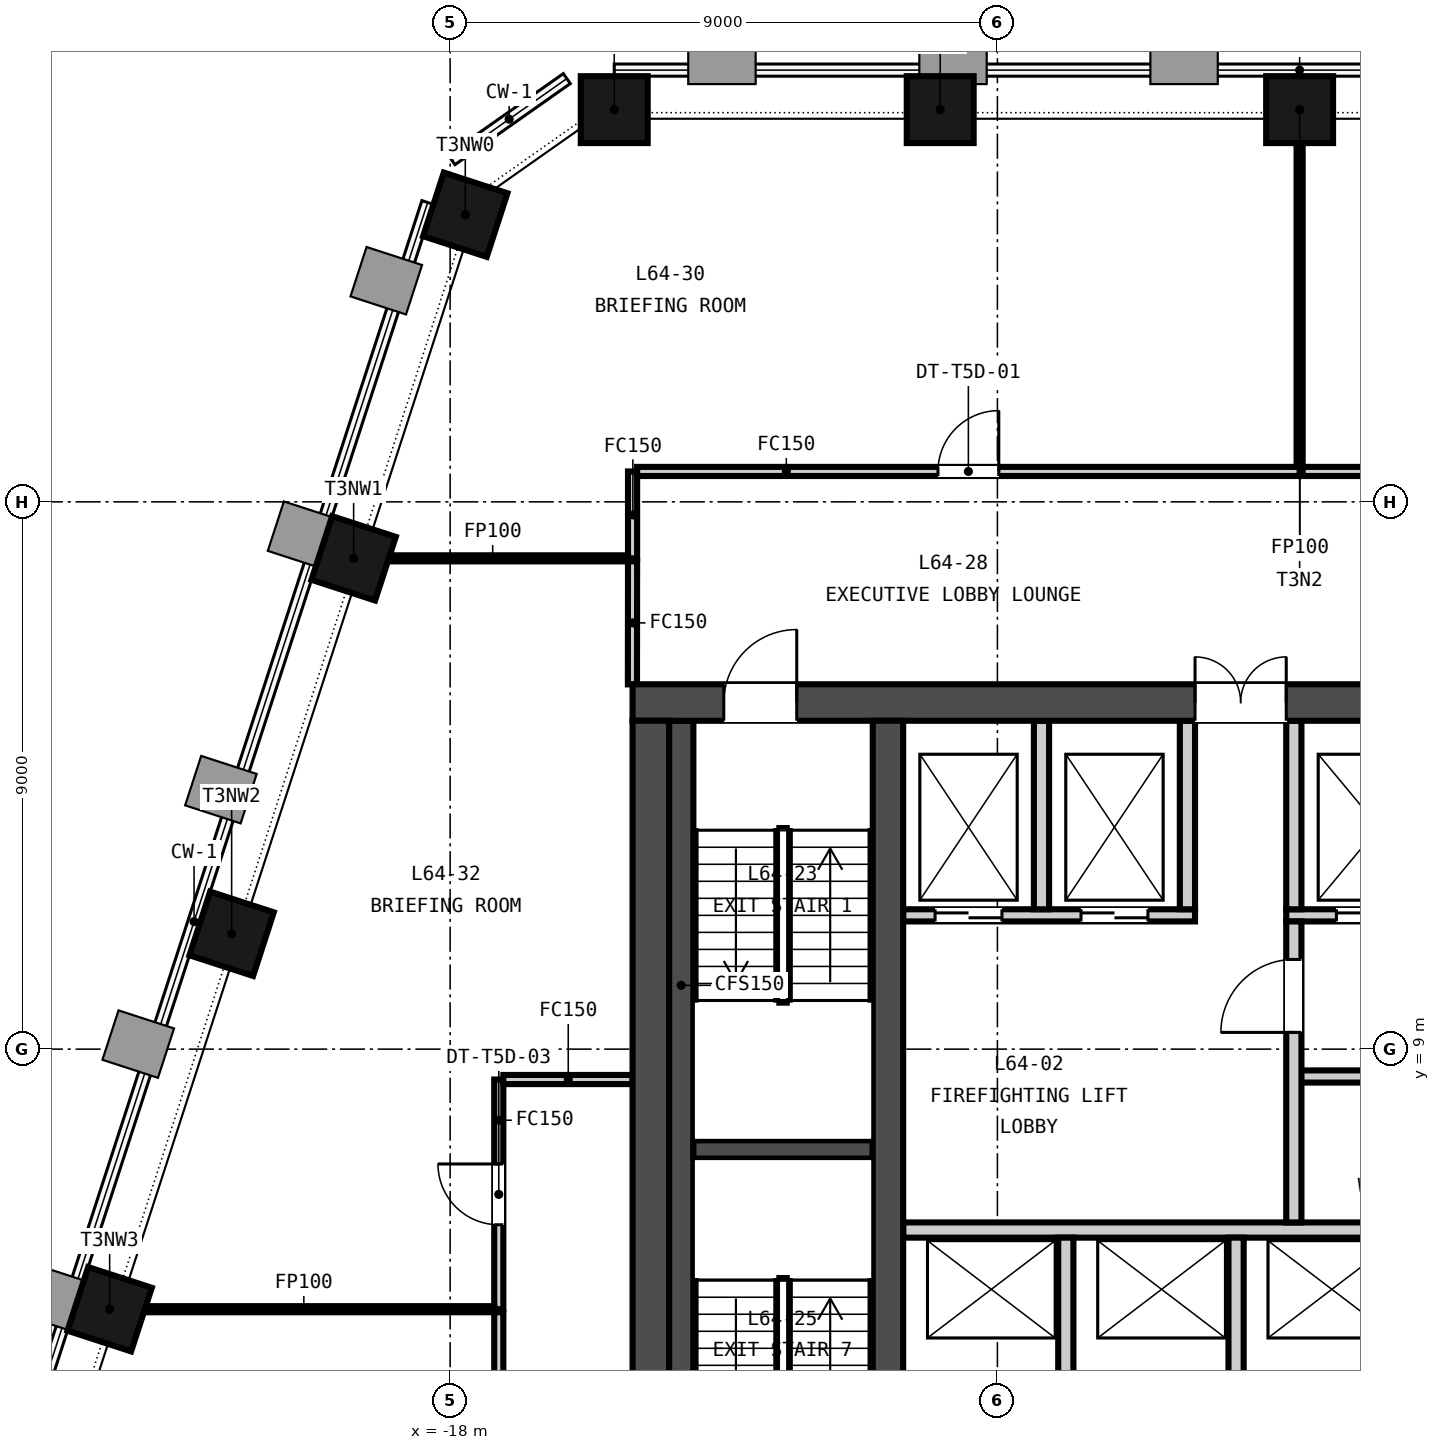
"""IFC4 building model, lengths in metres.
Left out: names, types, materials, properties, quantities, classifications, styles, units other than length and angle.
Written with IfcOpenShell. Run it as: python <this file> out.ifc"""

import sys

from ifc_helpers import new_model, si_unit, direction, frame, frame_2d, origin, origin_2d, place, context, subcontext, project, spatial, rectangle, extrude, element, fill, save


model = new_model("IFC4")
c1 = context("Model", 3, precision=1e-05, world=origin(), true_north=direction((0.0, 1.0)))
c2 = subcontext(c1, "Body", "Model", "MODEL_VIEW")
j1 = project(units=[si_unit("LENGTHUNIT", "METRE"), si_unit("PLANEANGLEUNIT", "RADIAN")], contexts=[c1])
p1 = place(None, origin())
s1 = spatial("IfcSite", under=j1, at=p1, CompositionType="ELEMENT")
p2 = place(p1, origin())
s2 = spatial("IfcBuilding", under=s1, at=p2, CompositionType="ELEMENT")
p3 = place(p2, frame((0.0, 0.0, 252.8)))
s3 = spatial("IfcBuildingStorey", under=s2, at=p3, CompositionType="ELEMENT", Elevation=252.8)
p4 = place(p3, frame((-15.0, 14.7, -0.15), z_axis=(0.0, 0.0, 1.0), x_axis=(1.0, 0.0, 0.0)))
e1 = element("IfcWall", 1, at=p4, inside=s3, PredefinedType="SOLIDWALL", context=c2, shape_type="SweptSolid", body=[
    extrude(rectangle(XDim=30.0, YDim=0.6, at=frame_2d((15.0, 0.0))), origin(), (0.0, 0.0, 1.0), 3.5),
])
p5 = place(p4, frame((9.25, 0.0, 0.15)))
e2 = element("IfcOpeningElement", 2, at=p5, cuts=e1, PredefinedType="OPENING", context=c2, shape_type="SweptSolid", body=[
    extrude(rectangle(XDim=1.5, YDim=2.1, at=frame_2d((0.75, 1.05))), frame((0.0, 0.31, 0.0), z_axis=(0.0, -1.0, 0.0), x_axis=(1.0, 0.0, 0.0)), (0.0, 0.0, 1.0), 0.62),
])
p6 = place(p4, frame((19.4, 0.0, 0.15)))
e3 = element("IfcOpeningElement", 3, at=p6, cuts=e1, PredefinedType="OPENING", context=c2, shape_type="SweptSolid", body=[
    extrude(rectangle(XDim=1.5, YDim=2.1, at=frame_2d((0.75, 1.05))), frame((0.0, 0.31, 0.0), z_axis=(0.0, -1.0, 0.0), x_axis=(1.0, 0.0, 0.0)), (0.0, 0.0, 1.0), 0.62),
])
p7 = place(p4, frame((1.5, 0.0, 0.15)))
e4 = element("IfcOpeningElement", 4, at=p7, cuts=e1, PredefinedType="OPENING", context=c2, shape_type="SweptSolid", body=[
    extrude(rectangle(XDim=1.2, YDim=2.1, at=frame_2d((0.6, 1.05))), frame((0.0, 0.31, 0.0), z_axis=(0.0, -1.0, 0.0), x_axis=(1.0, 0.0, 0.0)), (0.0, 0.0, 1.0), 0.62),
])
p8 = place(p4, frame((27.3, 0.0, 0.15)))
e5 = element("IfcOpeningElement", 5, at=p8, cuts=e1, PredefinedType="OPENING", context=c2, shape_type="SweptSolid", body=[
    extrude(rectangle(XDim=1.2, YDim=2.1, at=frame_2d((0.6, 1.05))), frame((0.0, 0.31, 0.0), z_axis=(0.0, -1.0, 0.0), x_axis=(1.0, 0.0, 0.0)), (0.0, 0.0, 1.0), 0.62),
])
p9 = place(p3, frame((-14.7, 0.6, -0.15), z_axis=(0.0, 0.0, 1.0), x_axis=(0.0, 1.0, 0.0)))
e6 = element("IfcWall", 6, at=p9, inside=s3, PredefinedType="SOLIDWALL", context=c2, shape_type="SweptSolid", body=[
    extrude(rectangle(XDim=13.8, YDim=0.6, at=frame_2d((6.9, 0.0))), origin(), (0.0, 0.0, 1.0), 3.5),
])
p10 = place(p3, frame((-10.8, 0.6, -0.15), z_axis=(0.0, 0.0, 1.0), x_axis=(0.0, 1.0, 0.0)))
e7 = element("IfcWall", 7, at=p10, inside=s3, PredefinedType="SOLIDWALL", context=c2, shape_type="SweptSolid", body=[
    extrude(rectangle(XDim=13.8, YDim=0.5, at=frame_2d((6.9, 0.0))), origin(), (0.0, 0.0, 1.0), 3.5),
])
for number, where, z_axis, x_axis in (
    (8, (-4.03, 24.45, -0.15), (0.0, 0.0, 1.0), (-1.0, 0.0, 0.0)),
    (9, (-9.941, 24.45, -0.15), (0.0, 0.0, 1.0), (-1.0, 0.0, 0.0)),
    (10, (-15.301, 24.45, -0.15), (0.0, 0.0, 1.0), (-1.0, 0.0, 0.0)),
    (11, (-17.751, 22.722, -0.15), (0.0, 0.0, 1.0), (-0.309, -0.951, 0.0)),
    (12, (-19.587, 17.071, -0.15), (0.0, 0.0, 1.0), (-0.309, -0.951, 0.0)),
    (13, (-21.593, 10.897, -0.15), (0.0, 0.0, 1.0), (-0.309, -0.951, 0.0)),
    (14, (-23.599, 4.723, -0.15), (0.0, 0.0, 1.0), (-0.309, -0.951, 0.0)),
):
    element("IfcColumn", number, at=place(p3, frame(where, z_axis=z_axis, x_axis=x_axis)), inside=s3, PredefinedType="COLUMN", context=c2, shape_type="SweptSolid", body=[
        extrude(rectangle(XDim=1.1, YDim=1.1, at=origin_2d()), origin(), (0.0, 0.0, 1.0), 3.5),
    ])
p11 = place(p3, frame((-10.55, 6.025, 0.0), z_axis=(0.0, 0.0, 1.0), x_axis=(1.0, 0.0, 0.0)))
e15 = element("IfcWall", 15, at=p11, inside=s3, PredefinedType="PARTITIONING", context=c2, shape_type="SweptSolid", body=[
    extrude(rectangle(XDim=21.1, YDim=0.25, at=frame_2d((10.55, 0.0))), origin(), (0.0, 0.0, 1.0), 3.35),
])
p12 = place(p3, frame((-4.125, 8.55, 0.0), z_axis=(0.0, 0.0, 1.0), x_axis=(1.0, 0.0, 0.0)))
e16 = element("IfcWall", 16, at=p12, inside=s3, PredefinedType="PARTITIONING", context=c2, shape_type="SweptSolid", body=[
    extrude(rectangle(XDim=14.675, YDim=0.2, at=frame_2d((7.337, 0.0))), origin(), (0.0, 0.0, 1.0), 3.35),
])
p13 = place(p12, frame((1.413, 0.0, 0.0)))
e17 = element("IfcOpeningElement", 17, at=p13, cuts=e16, PredefinedType="OPENING", context=c2, shape_type="SweptSolid", body=[
    extrude(rectangle(XDim=1.0, YDim=2.1, at=frame_2d((0.5, 1.05))), frame((0.0, 0.11, 0.0), z_axis=(0.0, -1.0, 0.0), x_axis=(1.0, 0.0, 0.0)), (0.0, 0.0, 1.0), 0.22),
])
p14 = place(p12, frame((5.0, 0.0, 0.0)))
e18 = element("IfcOpeningElement", 18, at=p14, cuts=e16, PredefinedType="OPENING", context=c2, shape_type="SweptSolid", body=[
    extrude(rectangle(XDim=1.0, YDim=2.1, at=frame_2d((0.5, 1.05))), frame((0.0, 0.11, 0.0), z_axis=(0.0, -1.0, 0.0), x_axis=(1.0, 0.0, 0.0)), (0.0, 0.0, 1.0), 0.22),
])
p15 = place(p12, frame((9.613, 0.0, 0.0)))
e19 = element("IfcOpeningElement", 19, at=p15, cuts=e16, PredefinedType="OPENING", context=c2, shape_type="SweptSolid", body=[
    extrude(rectangle(XDim=1.0, YDim=2.1, at=frame_2d((0.5, 1.05))), frame((0.0, 0.11, 0.0), z_axis=(0.0, -1.0, 0.0), x_axis=(1.0, 0.0, 0.0)), (0.0, 0.0, 1.0), 0.22),
])
p16 = place(p12, frame((13.475, 0.0, 0.0)))
e20 = element("IfcOpeningElement", 20, at=p16, cuts=e16, PredefinedType="OPENING", context=c2, shape_type="SweptSolid", body=[
    extrude(rectangle(XDim=0.9, YDim=2.1, at=frame_2d((0.45, 1.05))), frame((0.0, 0.11, 0.0), z_axis=(0.0, -1.0, 0.0), x_axis=(1.0, 0.0, 0.0)), (0.0, 0.0, 1.0), 0.22),
])
p17 = place(p3, frame((-10.55, 11.2, 0.0), z_axis=(0.0, 0.0, 1.0), x_axis=(1.0, 0.0, 0.0)))
e21 = element("IfcWall", 21, at=p17, inside=s3, PredefinedType="PARTITIONING", context=c2, shape_type="SweptSolid", body=[
    extrude(rectangle(XDim=4.8, YDim=0.2, at=frame_2d((2.4, 0.0))), origin(), (0.0, 0.0, 1.0), 3.35),
])
p18 = place(p17, frame((0.525, 0.0, 0.0)))
e22 = element("IfcOpeningElement", 22, at=p18, cuts=e21, PredefinedType="OPENING", context=c2, shape_type="SweptSolid", body=[
    extrude(rectangle(XDim=1.1, YDim=2.1, at=frame_2d((0.55, 1.05))), frame((0.0, 0.11, 0.0), z_axis=(0.0, -1.0, 0.0), x_axis=(1.0, 0.0, 0.0)), (0.0, 0.0, 1.0), 0.22),
])
p19 = place(p17, frame((2.925, 0.0, 0.0)))
e23 = element("IfcOpeningElement", 23, at=p19, cuts=e21, PredefinedType="OPENING", context=c2, shape_type="SweptSolid", body=[
    extrude(rectangle(XDim=1.1, YDim=2.1, at=frame_2d((0.55, 1.05))), frame((0.0, 0.11, 0.0), z_axis=(0.0, -1.0, 0.0), x_axis=(1.0, 0.0, 0.0)), (0.0, 0.0, 1.0), 0.22),
])
p20 = place(p3, frame((-4.25, 11.2, 0.0), z_axis=(0.0, 0.0, 1.0), x_axis=(1.0, 0.0, 0.0)))
e24 = element("IfcWall", 24, at=p20, inside=s3, PredefinedType="PARTITIONING", context=c2, shape_type="SweptSolid", body=[
    extrude(rectangle(XDim=8.65, YDim=0.2, at=frame_2d((4.325, 0.0))), origin(), (0.0, 0.0, 1.0), 3.35),
])
p21 = place(p20, frame((0.825, 0.0, 0.0)))
e25 = element("IfcOpeningElement", 25, at=p21, cuts=e24, PredefinedType="OPENING", context=c2, shape_type="SweptSolid", body=[
    extrude(rectangle(XDim=1.4, YDim=2.1, at=frame_2d((0.7, 1.05))), frame((0.0, 0.11, 0.0), z_axis=(0.0, -1.0, 0.0), x_axis=(1.0, 0.0, 0.0)), (0.0, 0.0, 1.0), 0.22),
])
p22 = place(p20, frame((3.625, 0.0, 0.0)))
e26 = element("IfcOpeningElement", 26, at=p22, cuts=e24, PredefinedType="OPENING", context=c2, shape_type="SweptSolid", body=[
    extrude(rectangle(XDim=1.4, YDim=2.1, at=frame_2d((0.7, 1.05))), frame((0.0, 0.11, 0.0), z_axis=(0.0, -1.0, 0.0), x_axis=(1.0, 0.0, 0.0)), (0.0, 0.0, 1.0), 0.22),
])
p23 = place(p20, frame((6.675, 0.0, 0.0)))
e27 = element("IfcOpeningElement", 27, at=p23, cuts=e24, PredefinedType="OPENING", context=c2, shape_type="SweptSolid", body=[
    extrude(rectangle(XDim=0.9, YDim=2.1, at=frame_2d((0.45, 1.05))), frame((0.0, 0.11, 0.0), z_axis=(0.0, -1.0, 0.0), x_axis=(1.0, 0.0, 0.0)), (0.0, 0.0, 1.0), 0.22),
])
p24 = place(p3, frame((-4.125, 6.15, 0.0), z_axis=(0.0, 0.0, 1.0), x_axis=(0.0, 1.0, 0.0)))
e28 = element("IfcWall", 28, at=p24, inside=s3, PredefinedType="PARTITIONING", context=c2, shape_type="SweptSolid", body=[
    extrude(rectangle(XDim=4.95, YDim=0.25, at=frame_2d((2.475, 0.0))), origin(), (0.0, 0.0, 1.0), 3.35),
])
p25 = place(p24, frame((3.125, 0.0, 0.0)))
e29 = element("IfcOpeningElement", 29, at=p25, cuts=e28, PredefinedType="OPENING", context=c2, shape_type="SweptSolid", body=[
    extrude(rectangle(XDim=1.2, YDim=2.1, at=frame_2d((0.6, 1.05))), frame((0.0, 0.135, 0.0), z_axis=(0.0, -1.0, 0.0), x_axis=(1.0, 0.0, 0.0)), (0.0, 0.0, 1.0), 0.27),
])
for number, where, z_axis, x_axis in (
    (30, (-7.875, 3.6, 0.0), (0.0, 0.0, 1.0), (0.0, 1.0, 0.0)),
    (31, (-5.075, 3.6, 0.0), (0.0, 0.0, 1.0), (0.0, 1.0, 0.0)),
):
    element("IfcWall", number, at=place(p3, frame(where, z_axis=z_axis, x_axis=x_axis)), inside=s3, PredefinedType="PARTITIONING", context=c2, shape_type="SweptSolid", body=[
        extrude(rectangle(XDim=2.3, YDim=0.25, at=frame_2d((1.15, 0.0))), origin(), (0.0, 0.0, 1.0), 3.35),
    ])
for number, where, z_axis, x_axis in (
    (32, (-8.275, 11.3, 0.0), (0.0, 0.0, 1.0), (0.0, 1.0, 0.0)),
    (33, (-5.875, 11.3, 0.0), (0.0, 0.0, 1.0), (0.0, 1.0, 0.0)),
    (34, (-4.125, 11.3, 0.0), (0.0, 0.0, 1.0), (0.0, 1.0, 0.0)),
):
    element("IfcWall", number, at=place(p3, frame(where, z_axis=z_axis, x_axis=x_axis)), inside=s3, PredefinedType="PARTITIONING", context=c2, shape_type="SweptSolid", body=[
        extrude(rectangle(XDim=3.1, YDim=0.25, at=frame_2d((1.55, 0.0))), origin(), (0.0, 0.0, 1.0), 3.35),
    ])
p26 = place(p3, frame((-14.0, 7.35, 0.0), z_axis=(0.0, 0.0, 1.0), x_axis=(1.0, 0.0, 0.0)))
e35 = element("IfcWall", 35, at=p26, inside=s3, PredefinedType="SOLIDWALL", context=c2, shape_type="SweptSolid", body=[
    extrude(rectangle(XDim=2.95, YDim=0.3, at=frame_2d((1.475, 0.0))), origin(), (0.0, 0.0, 1.0), 3.35),
])
p27 = place(p3, frame((-14.2, 0.6, 0.0), z_axis=(0.0, 0.0, 1.0), x_axis=(0.0, 1.0, 0.0)))
e36 = element("IfcWall", 36, at=p27, inside=s3, PredefinedType="SOLIDWALL", context=c2, shape_type="SweptSolid", body=[
    extrude(rectangle(XDim=13.8, YDim=0.4, at=frame_2d((6.9, 0.0))), origin(), (0.0, 0.0, 1.0), 3.35),
])
p28 = place(p3, frame((-15.0, 17.071, 0.0), z_axis=(0.0, 0.0, 1.0), x_axis=(0.0, 1.0, 0.0)))
e37 = element("IfcWall", 37, at=p28, inside=s3, PredefinedType="PARTITIONING", context=c2, shape_type="SweptSolid", body=[
    extrude(rectangle(XDim=1.429, YDim=0.15, at=frame_2d((0.714, 0.0))), origin(), (0.0, 0.0, 1.0), 2.601),
])
p29 = place(p3, frame((-14.925, 18.5, 0.0), z_axis=(0.0, 0.0, 1.0), x_axis=(1.0, 0.0, 0.0)))
e38 = element("IfcWall", 38, at=p29, inside=s3, PredefinedType="PARTITIONING", context=c2, shape_type="SweptSolid", body=[
    extrude(rectangle(XDim=10.895, YDim=0.15, at=frame_2d((5.448, 0.0))), origin(), (0.0, 0.0, 1.0), 2.601),
])
p30 = place(p29, frame((4.948, 0.0, 0.0)))
e39 = element("IfcOpeningElement", 39, at=p30, cuts=e38, PredefinedType="OPENING", context=c2, shape_type="SweptSolid", body=[
    extrude(rectangle(XDim=1.0, YDim=2.1, at=frame_2d((0.5, 1.05))), frame((0.0, 0.085, 0.0), z_axis=(0.0, -1.0, 0.0), x_axis=(1.0, 0.0, 0.0)), (0.0, 0.0, 1.0), 0.17),
])
p31 = place(p3, frame((-4.03, 18.575, 0.0), z_axis=(0.0, 0.0, 1.0), x_axis=(0.0, 1.0, 0.0)))
e40 = element("IfcWall", 40, at=p31, inside=s3, PredefinedType="PARTITIONING", context=c2, shape_type="SweptSolid", body=[
    extrude(rectangle(XDim=5.825, YDim=0.1, at=frame_2d((2.913, 0.0))), origin(), (0.0, 0.0, 1.0), 2.601),
])
p32 = place(p3, frame((-19.535, 17.071, 0.0), z_axis=(0.0, 0.0, 1.0), x_axis=(1.0, 0.0, 0.0)))
e41 = element("IfcWall", 41, at=p32, inside=s3, PredefinedType="PARTITIONING", context=c2, shape_type="SweptSolid", body=[
    extrude(rectangle(XDim=4.46, YDim=0.1, at=frame_2d((2.23, 0.0))), origin(), (0.0, 0.0, 1.0), 2.601),
])
p33 = place(p3, frame((-3.98, 18.5, 0.0), z_axis=(0.0, 0.0, 1.0), x_axis=(1.0, 0.0, 0.0)))
e42 = element("IfcWall", 42, at=p33, inside=s3, PredefinedType="PARTITIONING", context=c2, shape_type="SweptSolid", body=[
    extrude(rectangle(XDim=16.595, YDim=0.15, at=frame_2d((8.297, 0.0))), origin(), (0.0, 0.0, 1.0), 2.601),
])
p34 = place(p33, frame((7.847, 0.0, 0.0)))
e43 = element("IfcOpeningElement", 43, at=p34, cuts=e42, PredefinedType="OPENING", context=c2, shape_type="SweptSolid", body=[
    extrude(rectangle(XDim=0.9, YDim=2.1, at=frame_2d((0.45, 1.05))), frame((0.0, 0.085, 0.0), z_axis=(0.0, -1.0, 0.0), x_axis=(1.0, 0.0, 0.0)), (0.0, 0.0, 1.0), 0.17),
])
p35 = place(p3, frame((-15.002, 14.998, 0.0), z_axis=(0.0, 0.0, 1.0), x_axis=(0.000965483499, 0.999999533921, 0.0)))
e44 = element("IfcWall", 44, at=p35, inside=s3, PredefinedType="PARTITIONING", context=c2, shape_type="SweptSolid", body=[
    extrude(rectangle(XDim=2.023, YDim=0.15, at=frame_2d((1.011, 0.0))), origin(), (0.0, 0.0, 1.0), 2.601),
])
p36 = place(p3, frame((-17.2, 4.723, 0.0), z_axis=(0.0, 0.0, 1.0), x_axis=(0.0, 1.0, 0.0)))
e45 = element("IfcWall", 45, at=p36, inside=s3, PredefinedType="PARTITIONING", context=c2, shape_type="SweptSolid", body=[
    extrude(rectangle(XDim=3.777, YDim=0.15, at=frame_2d((1.889, 0.0))), origin(), (0.0, 0.0, 1.0), 2.601),
])
p37 = place(p36, frame((1.388, 0.0, 0.0)))
e46 = element("IfcOpeningElement", 46, at=p37, cuts=e45, PredefinedType="OPENING", context=c2, shape_type="SweptSolid", body=[
    extrude(rectangle(XDim=1.0, YDim=2.1, at=frame_2d((0.5, 1.05))), frame((0.0, 0.085, 0.0), z_axis=(0.0, -1.0, 0.0), x_axis=(1.0, 0.0, 0.0)), (0.0, 0.0, 1.0), 0.17),
])
p38 = place(p3, frame((-17.125, 8.5, 0.0), z_axis=(0.0, 0.0, 1.0), x_axis=(1.0, 0.0, 0.0)))
e47 = element("IfcWall", 47, at=p38, inside=s3, PredefinedType="PARTITIONING", context=c2, shape_type="SweptSolid", body=[
    extrude(rectangle(XDim=2.125, YDim=0.15, at=frame_2d((1.062, 0.0))), origin(), (0.0, 0.0, 1.0), 2.601),
])
p39 = place(p3, frame((-23.547, 4.723, 0.0), z_axis=(0.0, 0.0, 1.0), x_axis=(1.0, 0.0, 0.0)))
e48 = element("IfcWall", 48, at=p39, inside=s3, PredefinedType="PARTITIONING", context=c2, shape_type="SweptSolid", body=[
    extrude(rectangle(XDim=6.272, YDim=0.1, at=frame_2d((3.136, 0.0))), origin(), (0.0, 0.0, 1.0), 2.601),
])
p40 = place(p3, frame((-17.2, -4.1, 0.0), z_axis=(0.0, 0.0, 1.0), x_axis=(0.0, 1.0, 0.0)))
e49 = element("IfcWall", 49, at=p40, inside=s3, PredefinedType="PARTITIONING", context=c2, shape_type="SweptSolid", body=[
    extrude(rectangle(XDim=8.773, YDim=0.15, at=frame_2d((4.387, 0.0))), origin(), (0.0, 0.0, 1.0), 2.601),
])
p41 = place(p40, frame((3.886, 0.0, 0.0)))
e50 = element("IfcOpeningElement", 50, at=p41, cuts=e49, PredefinedType="OPENING", context=c2, shape_type="SweptSolid", body=[
    extrude(rectangle(XDim=1.0, YDim=2.1, at=frame_2d((0.5, 1.05))), frame((0.0, 0.085, 0.0), z_axis=(0.0, -1.0, 0.0), x_axis=(1.0, 0.0, 0.0)), (0.0, 0.0, 1.0), 0.17),
])
p42 = place(p25, origin())
e51 = element("IfcDoor", 51, at=p42, inside=s3, OperationType="SINGLE_SWING_LEFT", PredefinedType="DOOR", context=c2, shape_type="SweptSolid", body=[
    extrude(rectangle(XDim=1.2, YDim=2.1, at=frame_2d((0.6, 1.05))), frame((0.0, 0.025, 0.0), z_axis=(0.0, -1.0, 0.0), x_axis=(1.0, 0.0, 0.0)), (0.0, 0.0, 1.0), 0.05),
])
fill(e29, e51)
p43 = place(p18, origin())
e52 = element("IfcDoor", 52, at=p43, inside=s3, OperationType="DOUBLE_DOOR_SLIDING", PredefinedType="DOOR", context=c2, shape_type="SweptSolid", body=[
    extrude(rectangle(XDim=1.1, YDim=2.1, at=frame_2d((0.55, 1.05))), frame((0.0, 0.025, 0.0), z_axis=(0.0, -1.0, 0.0), x_axis=(1.0, 0.0, 0.0)), (0.0, 0.0, 1.0), 0.05),
])
fill(e22, e52)
p44 = place(p19, origin())
e53 = element("IfcDoor", 53, at=p44, inside=s3, OperationType="DOUBLE_DOOR_SLIDING", PredefinedType="DOOR", context=c2, shape_type="SweptSolid", body=[
    extrude(rectangle(XDim=1.1, YDim=2.1, at=frame_2d((0.55, 1.05))), frame((0.0, 0.025, 0.0), z_axis=(0.0, -1.0, 0.0), x_axis=(1.0, 0.0, 0.0)), (0.0, 0.0, 1.0), 0.05),
])
fill(e23, e53)
p45 = place(p21, origin())
e54 = element("IfcDoor", 54, at=p45, inside=s3, OperationType="DOUBLE_DOOR_SLIDING", PredefinedType="DOOR", context=c2, shape_type="SweptSolid", body=[
    extrude(rectangle(XDim=1.4, YDim=2.1, at=frame_2d((0.7, 1.05))), frame((0.0, 0.025, 0.0), z_axis=(0.0, -1.0, 0.0), x_axis=(1.0, 0.0, 0.0)), (0.0, 0.0, 1.0), 0.05),
])
fill(e25, e54)
p46 = place(p5, origin())
e55 = element("IfcDoor", 55, at=p46, inside=s3, OperationType="DOUBLE_DOOR_SINGLE_SWING", PredefinedType="DOOR", context=c2, shape_type="SweptSolid", body=[
    extrude(rectangle(XDim=1.5, YDim=2.1, at=frame_2d((0.75, 1.05))), frame((0.0, 0.025, 0.0), z_axis=(0.0, -1.0, 0.0), x_axis=(1.0, 0.0, 0.0)), (0.0, 0.0, 1.0), 0.05),
])
fill(e2, e55)
p47 = place(p7, origin())
e56 = element("IfcDoor", 56, at=p47, inside=s3, OperationType="SINGLE_SWING_RIGHT", PredefinedType="DOOR", context=c2, shape_type="SweptSolid", body=[
    extrude(rectangle(XDim=1.2, YDim=2.1, at=frame_2d((0.6, 1.05))), frame((0.0, 0.025, 0.0), z_axis=(0.0, -1.0, 0.0), x_axis=(1.0, 0.0, 0.0)), (0.0, 0.0, 1.0), 0.05),
])
fill(e4, e56)
p48 = place(p30, origin())
e57 = element("IfcDoor", 57, at=p48, inside=s3, OperationType="SINGLE_SWING_RIGHT", PredefinedType="DOOR", context=c2, shape_type="SweptSolid", body=[
    extrude(rectangle(XDim=1.0, YDim=2.1, at=frame_2d((0.5, 1.05))), frame((0.0, 0.025, 0.0), z_axis=(0.0, -1.0, 0.0), x_axis=(1.0, 0.0, 0.0)), (0.0, 0.0, 1.0), 0.05),
])
fill(e39, e57)
p49 = place(p37, origin())
e58 = element("IfcDoor", 58, at=p49, inside=s3, OperationType="SINGLE_SWING_RIGHT", PredefinedType="DOOR", context=c2, shape_type="SweptSolid", body=[
    extrude(rectangle(XDim=1.0, YDim=2.1, at=frame_2d((0.5, 1.05))), frame((0.0, 0.025, 0.0), z_axis=(0.0, -1.0, 0.0), x_axis=(1.0, 0.0, 0.0)), (0.0, 0.0, 1.0), 0.05),
])
fill(e46, e58)
save(model, sys.argv[1])
